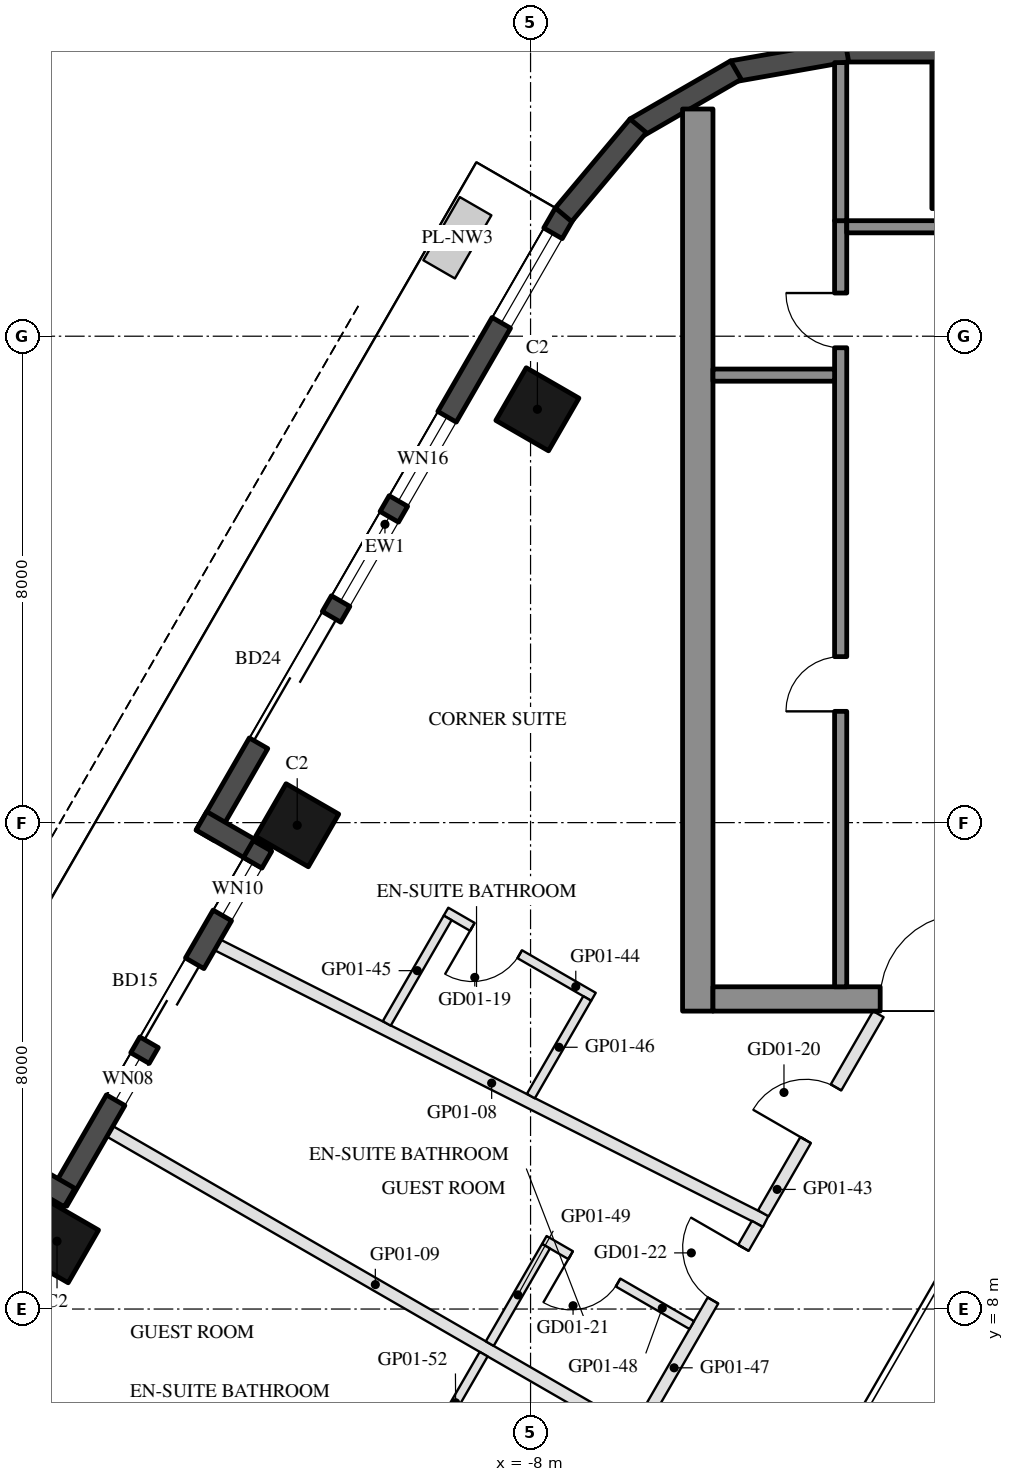
"""IFC4 building model, lengths in metres.
Left out: names, types, materials, properties, quantities, classifications, styles, units other than length and angle.
Written with IfcOpenShell. Run it as: python <this file> out.ifc"""

import sys

from ifc_helpers import new_model, si_unit, direction, frame, frame_2d, origin, origin_2d, place, context, subcontext, project, spatial, rectangle, hollow_rectangle, extrude, element, fill, save


model = new_model("IFC4")
c1 = context("Model", 3, precision=1e-05, world=origin(), true_north=direction((0.0, 1.0)))
c2 = subcontext(c1, "Body", "Model", "MODEL_VIEW")
j1 = project(units=[si_unit("LENGTHUNIT", "METRE"), si_unit("PLANEANGLEUNIT", "RADIAN")], contexts=[c1])
p1 = place(None, origin())
s1 = spatial("IfcSite", under=j1, at=p1, CompositionType="ELEMENT")
p2 = place(p1, origin())
s2 = spatial("IfcBuilding", under=s1, at=p2, CompositionType="ELEMENT")
p3 = place(p2, frame((0.0, 0.0, 50.2)))
s3 = spatial("IfcBuildingStorey", under=s2, at=p3, CompositionType="ELEMENT", Elevation=50.2)
for number, where, z_axis, x_axis in (
    (1, (-7.888, 22.798, 0.0), (0.0, 0.0, 1.0), (0.5, 0.866, 0.0)),
    (2, (-11.838, 15.957, 0.0), (0.0, 0.0, 1.0), (0.5, 0.866, 0.0)),
    (3, (-15.788, 9.115, 0.0), (0.0, 0.0, 1.0), (0.5, 0.866, 0.0)),
):
    element("IfcColumn", number, at=place(p3, frame(where, z_axis=z_axis, x_axis=x_axis)), inside=s3, PredefinedType="COLUMN", context=c2, shape_type="SweptSolid", body=[
        extrude(hollow_rectangle(XDim=1.0, YDim=1.0, WallThickness=0.045, at=origin_2d()), origin(), (0.0, 0.0, 1.0), 3.7),
    ])
p4 = place(p3, frame((0.0, 27.3, 0.0), z_axis=(0.0, 0.0, 1.0), x_axis=(1.0, 0.0, 0.0)))
e4 = element("IfcColumn", 4, at=p4, inside=s3, PredefinedType="COLUMN", context=c2, shape_type="SweptSolid", body=[
    extrude(hollow_rectangle(XDim=2.8, YDim=2.4, WallThickness=0.07, at=origin_2d()), origin(), (0.0, 0.0, 1.0), 3.7),
])
p5 = place(p3, frame((-7.441, 26.022, 0.0), z_axis=(0.0, 0.0, 1.0), x_axis=(-0.499992533062, -0.86602971478, 0.0)))
e5 = element("IfcWall", 5, at=p5, inside=s3, PredefinedType="SOLIDWALL", context=c2, shape_type="SweptSolid", body=[
    extrude(rectangle(XDim=11.816, YDim=0.35, at=frame_2d((5.908, 0.0))), origin(), (0.0, 0.0, 1.0), 3.55),
])
p6 = place(p5, frame((0.381, 0.0, 0.3)))
e6 = element("IfcOpeningElement", 6, at=p6, cuts=e5, PredefinedType="OPENING", context=c2, shape_type="SweptSolid", body=[
    extrude(rectangle(XDim=1.7, YDim=2.65, at=frame_2d((0.85, 1.325))), frame((0.0, 0.185, 0.0), z_axis=(0.0, -1.0, 0.0), x_axis=(1.0, 0.0, 0.0)), (0.0, 0.0, 1.0), 0.37),
])
p7 = place(p5, frame((7.666, 0.0, 0.0)))
e7 = element("IfcOpeningElement", 7, at=p7, cuts=e5, PredefinedType="OPENING", context=c2, shape_type="SweptSolid", body=[
    extrude(rectangle(XDim=2.4, YDim=2.4, at=frame_2d((1.2, 1.2))), frame((0.0, 0.185, 0.0), z_axis=(0.0, -1.0, 0.0), x_axis=(1.0, 0.0, 0.0)), (0.0, 0.0, 1.0), 0.37),
])
p8 = place(p5, frame((3.865, 0.0, 0.3)))
e8 = element("IfcOpeningElement", 8, at=p8, cuts=e5, PredefinedType="OPENING", context=c2, shape_type="SweptSolid", body=[
    extrude(rectangle(XDim=1.6, YDim=2.65, at=frame_2d((0.8, 1.325))), frame((0.0, 0.185, 0.0), z_axis=(0.0, -1.0, 0.0), x_axis=(1.0, 0.0, 0.0)), (0.0, 0.0, 1.0), 0.37),
])
p9 = place(p5, frame((5.765, 0.0, 0.3)))
e9 = element("IfcOpeningElement", 9, at=p9, cuts=e5, PredefinedType="OPENING", context=c2, shape_type="SweptSolid", body=[
    extrude(rectangle(XDim=1.6, YDim=2.65, at=frame_2d((0.8, 1.325))), frame((0.0, 0.185, 0.0), z_axis=(0.0, -1.0, 0.0), x_axis=(1.0, 0.0, 0.0)), (0.0, 0.0, 1.0), 0.37),
])
p10 = place(p3, frame((-13.413, 16.029, 0.0), z_axis=(0.0, 0.0, 1.0), x_axis=(0.866005645448, -0.500034220881, 0.0)))
e10 = element("IfcWall", 10, at=p10, inside=s3, PredefinedType="SOLIDWALL", context=c2, shape_type="SweptSolid", body=[
    extrude(rectangle(XDim=1.22, YDim=0.35, at=frame_2d((0.61, 0.0))), origin(), (0.0, 0.0, 1.0), 3.55),
])
p11 = place(p3, frame((-12.409, 15.617, 0.0), z_axis=(0.0, 0.0, 1.0), x_axis=(-0.500003597184, -0.866023326939, 0.0)))
e11 = element("IfcWall", 11, at=p11, inside=s3, PredefinedType="SOLIDWALL", context=c2, shape_type="SweptSolid", body=[
    extrude(rectangle(XDim=6.74, YDim=0.35, at=frame_2d((3.37, 0.0))), origin(), (0.0, 0.0, 1.0), 3.55),
])
p12 = place(p11, frame((0.32, 0.0, 0.3)))
e12 = element("IfcOpeningElement", 12, at=p12, cuts=e11, PredefinedType="OPENING", context=c2, shape_type="SweptSolid", body=[
    extrude(rectangle(XDim=1.0, YDim=2.65, at=frame_2d((0.5, 1.325))), frame((0.0, 0.185, 0.0), z_axis=(0.0, -1.0, 0.0), x_axis=(1.0, 0.0, 0.0)), (0.0, 0.0, 1.0), 0.37),
])
p13 = place(p11, frame((2.229, 0.0, 0.0)))
e13 = element("IfcOpeningElement", 13, at=p13, cuts=e11, PredefinedType="OPENING", context=c2, shape_type="SweptSolid", body=[
    extrude(rectangle(XDim=1.5, YDim=2.4, at=frame_2d((0.75, 1.2))), frame((0.0, 0.185, 0.0), z_axis=(0.0, -1.0, 0.0), x_axis=(1.0, 0.0, 0.0)), (0.0, 0.0, 1.0), 0.37),
])
p14 = place(p11, frame((4.029, 0.0, 0.3)))
e14 = element("IfcOpeningElement", 14, at=p14, cuts=e11, PredefinedType="OPENING", context=c2, shape_type="SweptSolid", body=[
    extrude(rectangle(XDim=0.8, YDim=2.65, at=frame_2d((0.4, 1.325))), frame((0.0, 0.185, 0.0), z_axis=(0.0, -1.0, 0.0), x_axis=(1.0, 0.0, 0.0)), (0.0, 0.0, 1.0), 0.37),
])
p15 = place(p3, frame((-15.581, 9.833, 0.0), z_axis=(0.0, 0.0, 1.0), x_axis=(-0.866055662726, 0.499947586314, 0.0)))
e15 = element("IfcWall", 15, at=p15, inside=s3, PredefinedType="SOLIDWALL", context=c2, shape_type="SweptSolid", body=[
    extrude(rectangle(XDim=1.22, YDim=0.35, at=frame_2d((0.61, 0.0))), origin(), (0.0, 0.0, 1.0), 3.55),
])
p16 = place(p3, frame((2.829, 28.685, 0.0), z_axis=(0.0, 0.0, 1.0), x_axis=(-1.0, 0.0, 0.0)))
e16 = element("IfcWall", 16, at=p16, inside=s3, PredefinedType="SOLIDWALL", context=c2, shape_type="SweptSolid", body=[
    extrude(rectangle(XDim=5.658, YDim=0.35, at=frame_2d((2.829, 0.0))), origin(), (0.0, 0.0, 1.0), 3.55),
])
for number, where, z_axis, x_axis in (
    (17, (-2.799, 28.688, 0.0), (0.0, 0.0, 1.0), (-0.985, -0.174, 0.0)),
    (18, (-4.623, 28.377, 0.0), (0.0, 0.0, 1.0), (-0.866, -0.5, 0.0)),
):
    element("IfcWall", number, at=place(p3, frame(where, z_axis=z_axis, x_axis=x_axis)), inside=s3, PredefinedType="SOLIDWALL", context=c2, shape_type="SweptSolid", body=[
        extrude(rectangle(XDim=1.91, YDim=0.35, at=frame_2d((0.955, 0.0))), origin(), (0.0, 0.0, 1.0), 3.55),
    ])
p17 = place(p3, frame((-6.23, 27.461, 0.0), z_axis=(0.0, 0.0, 1.0), x_axis=(-0.642808304945, -0.766027077259, 0.0)))
e19 = element("IfcWall", 19, at=p17, inside=s3, PredefinedType="SOLIDWALL", context=c2, shape_type="SweptSolid", body=[
    extrude(rectangle(XDim=1.91, YDim=0.35, at=frame_2d((0.955, 0.0))), origin(), (0.0, 0.0, 1.0), 3.55),
])
p18 = place(p3, frame((-5.25, 12.9, 0.0), z_axis=(0.0, 0.0, 1.0), x_axis=(0.0, 1.0, 0.0)))
e20 = element("IfcWall", 20, at=p18, inside=s3, PredefinedType="SHEAR", context=c2, shape_type="SweptSolid", body=[
    extrude(rectangle(XDim=14.837, YDim=0.5, at=frame_2d((7.418, 0.0))), origin(), (0.0, 0.0, 1.0), 3.5),
])
p19 = place(p3, frame((5.0, 13.1, 0.0), z_axis=(0.0, 0.0, 1.0), x_axis=(-1.0, 0.0, 0.0)))
e21 = element("IfcWall", 21, at=p19, inside=s3, PredefinedType="SHEAR", context=c2, shape_type="SweptSolid", body=[
    extrude(rectangle(XDim=10.0, YDim=0.4, at=frame_2d((5.0, 0.0))), origin(), (0.0, 0.0, 1.0), 3.5),
])
p20 = place(p19, frame((3.55, 0.0, 0.0)))
e22 = element("IfcOpeningElement", 22, at=p20, cuts=e21, PredefinedType="OPENING", context=c2, shape_type="SweptSolid", body=[
    extrude(rectangle(XDim=1.1, YDim=2.1, at=frame_2d((0.55, 1.05))), frame((0.0, 0.21, 0.0), z_axis=(0.0, -1.0, 0.0), x_axis=(1.0, 0.0, 0.0)), (0.0, 0.0, 1.0), 0.42),
])
p21 = place(p19, frame((5.85, 0.0, 0.0)))
e23 = element("IfcOpeningElement", 23, at=p21, cuts=e21, PredefinedType="OPENING", context=c2, shape_type="SweptSolid", body=[
    extrude(rectangle(XDim=1.4, YDim=2.1, at=frame_2d((0.7, 1.05))), frame((0.0, 0.21, 0.0), z_axis=(0.0, -1.0, 0.0), x_axis=(1.0, 0.0, 0.0)), (0.0, 0.0, 1.0), 0.42),
])
p22 = place(p3, frame((-2.9, 13.3, 0.0), z_axis=(0.0, 0.0, 1.0), x_axis=(0.0, 1.0, 0.0)))
e24 = element("IfcWall", 24, at=p22, inside=s3, PredefinedType="SHEAR", context=c2, shape_type="SweptSolid", body=[
    extrude(rectangle(XDim=12.6, YDim=0.2, at=frame_2d((6.3, 0.0))), origin(), (0.0, 0.0, 1.0), 3.5),
])
p23 = place(p22, frame((4.53, 0.0, 0.0)))
e25 = element("IfcOpeningElement", 25, at=p23, cuts=e24, PredefinedType="OPENING", context=c2, shape_type="SweptSolid", body=[
    extrude(rectangle(XDim=0.9, YDim=2.1, at=frame_2d((0.45, 1.05))), frame((0.0, 0.11, 0.0), z_axis=(0.0, -1.0, 0.0), x_axis=(1.0, 0.0, 0.0)), (0.0, 0.0, 1.0), 0.22),
])
p24 = place(p22, frame((10.51, 0.0, 0.0)))
e26 = element("IfcOpeningElement", 26, at=p24, cuts=e24, PredefinedType="OPENING", context=c2, shape_type="SweptSolid", body=[
    extrude(rectangle(XDim=0.9, YDim=2.1, at=frame_2d((0.45, 1.05))), frame((0.0, 0.11, 0.0), z_axis=(0.0, -1.0, 0.0), x_axis=(1.0, 0.0, 0.0)), (0.0, 0.0, 1.0), 0.22),
])
p25 = place(p3, frame((-0.4, 25.8, 0.0), z_axis=(0.0, 0.0, 1.0), x_axis=(-1.0, 0.0, 0.0)))
e27 = element("IfcWall", 27, at=p25, inside=s3, PredefinedType="SHEAR", context=c2, shape_type="SweptSolid", body=[
    extrude(rectangle(XDim=2.4, YDim=0.2, at=frame_2d((1.2, 0.0))), origin(), (0.0, 0.0, 1.0), 3.5),
])
p26 = place(p3, frame((-3.0, 23.36, 0.0), z_axis=(0.0, 0.0, 1.0), x_axis=(-1.0, 0.0, 0.0)))
e28 = element("IfcWall", 28, at=p26, inside=s3, PredefinedType="SHEAR", context=c2, shape_type="SweptSolid", body=[
    extrude(rectangle(XDim=2.0, YDim=0.2, at=frame_2d((1.0, 0.0))), origin(), (0.0, 0.0, 1.0), 3.5),
])
p27 = place(p3, frame((-2.9, 25.9, 0.0), z_axis=(0.0, 0.0, 1.0), x_axis=(0.0, 1.0, 0.0)))
e29 = element("IfcWall", 29, at=p27, inside=s3, PredefinedType="SHEAR", context=c2, shape_type="SweptSolid", body=[
    extrude(rectangle(XDim=2.6, YDim=0.2, at=frame_2d((1.3, 0.0))), origin(), (0.0, 0.0, 1.0), 3.5),
])
p28 = place(p3, frame((-13.147, 13.989, 0.0), z_axis=(0.0, 0.0, 1.0), x_axis=(0.892898572595, -0.450257858408, 0.0)))
e30 = element("IfcWall", 30, at=p28, inside=s3, PredefinedType="PARTITIONING", context=c2, shape_type="SweptSolid", body=[
    extrude(rectangle(XDim=10.096, YDim=0.2, at=frame_2d((5.048, 0.0))), origin(), (0.0, 0.0, 1.0), 2.96),
])
p29 = place(p3, frame((-14.917, 10.922, 0.0), z_axis=(0.0, 0.0, 1.0), x_axis=(0.866022637375, -0.500004791531, 0.0)))
e31 = element("IfcWall", 31, at=p29, inside=s3, PredefinedType="PARTITIONING", context=c2, shape_type="SweptSolid", body=[
    extrude(rectangle(XDim=10.08, YDim=0.2, at=frame_2d((5.04, 0.0))), origin(), (0.0, 0.0, 1.0), 2.96),
])
p30 = place(p3, frame((-17.997, 7.388, 0.0), z_axis=(0.0, 0.0, 1.0), x_axis=(0.892478457214, -0.451090016968, 0.0)))
e32 = element("IfcWall", 32, at=p30, inside=s3, PredefinedType="PARTITIONING", context=c2, shape_type="SweptSolid", body=[
    extrude(rectangle(XDim=10.997, YDim=0.2, at=frame_2d((5.499, 0.0))), origin(), (0.0, 0.0, 1.0), 2.96),
])
p31 = place(p3, frame((-4.172, 9.574, 0.0), z_axis=(0.0, 0.0, 1.0), x_axis=(0.499985062256, 0.866034027923, 0.0)))
e33 = element("IfcWall", 33, at=p31, inside=s3, PredefinedType="PARTITIONING", context=c2, shape_type="SweptSolid", body=[
    extrude(rectangle(XDim=3.782, YDim=0.2, at=frame_2d((1.891, 0.0))), origin(), (0.0, 0.0, 1.0), 2.95),
])
p32 = place(p31, frame((1.391, 0.0, 0.0)))
e34 = element("IfcOpeningElement", 34, at=p32, cuts=e33, PredefinedType="OPENING", context=c2, shape_type="SweptSolid", body=[
    extrude(rectangle(XDim=1.0, YDim=2.1, at=frame_2d((0.5, 1.05))), frame((0.0, 0.11, 0.0), z_axis=(0.0, -1.0, 0.0), x_axis=(1.0, 0.0, 0.0)), (0.0, 0.0, 1.0), 0.22),
])
p33 = place(p3, frame((-6.965, 13.136, 0.0), z_axis=(0.0, 0.0, 1.0), x_axis=(-0.866034573852, 0.49998411664, 0.0)))
e35 = element("IfcWall", 35, at=p33, inside=s3, PredefinedType="PARTITIONING", context=c2, shape_type="SweptSolid", body=[
    extrude(rectangle(XDim=2.8, YDim=0.15, at=frame_2d((1.4, 0.0))), origin(), (0.0, 0.0, 1.0), 2.95),
])
p34 = place(p33, frame((1.4, 0.0, 0.0)))
e36 = element("IfcOpeningElement", 36, at=p34, cuts=e35, PredefinedType="OPENING", context=c2, shape_type="SweptSolid", body=[
    extrude(rectangle(XDim=0.9, YDim=2.1, at=frame_2d((0.45, 1.05))), frame((0.0, 0.085, 0.0), z_axis=(0.0, -1.0, 0.0), x_axis=(1.0, 0.0, 0.0)), (0.0, 0.0, 1.0), 0.17),
])
p35 = place(p3, frame((-9.363, 14.433, 0.0), z_axis=(0.0, 0.0, 1.0), x_axis=(-0.500056363668, -0.86599285976, 0.0)))
e37 = element("IfcWall", 37, at=p35, inside=s3, PredefinedType="PARTITIONING", context=c2, shape_type="SweptSolid", body=[
    extrude(rectangle(XDim=2.004, YDim=0.15, at=frame_2d((1.002, 0.0))), origin(), (0.0, 0.0, 1.0), 2.95),
])
p36 = place(p3, frame((-7.068, 13.108, 0.0), z_axis=(0.0, 0.0, 1.0), x_axis=(-0.4999770169, -0.866038672677, 0.0)))
e38 = element("IfcWall", 38, at=p36, inside=s3, PredefinedType="PARTITIONING", context=c2, shape_type="SweptSolid", body=[
    extrude(rectangle(XDim=1.854, YDim=0.15, at=frame_2d((0.927, 0.0))), origin(), (0.0, 0.0, 1.0), 2.95),
])
p37 = place(p3, frame((-6.225, 6.019, 0.0), z_axis=(0.0, 0.0, 1.0), x_axis=(0.499998439657, 0.866026304647, 0.0)))
e39 = element("IfcWall", 39, at=p37, inside=s3, PredefinedType="PARTITIONING", context=c2, shape_type="SweptSolid", body=[
    extrude(rectangle(XDim=3.905, YDim=0.2, at=frame_2d((1.953, 0.0))), origin(), (0.0, 0.0, 1.0), 2.95),
])
p38 = place(p37, frame((2.45, 0.0, 0.0)))
e40 = element("IfcOpeningElement", 40, at=p38, cuts=e39, PredefinedType="OPENING", context=c2, shape_type="SweptSolid", body=[
    extrude(rectangle(XDim=1.0, YDim=2.1, at=frame_2d((0.5, 1.05))), frame((0.0, 0.11, 0.0), z_axis=(0.0, -1.0, 0.0), x_axis=(1.0, 0.0, 0.0)), (0.0, 0.0, 1.0), 0.22),
])
p39 = place(p3, frame((-5.349, 7.736, 0.0), z_axis=(0.0, 0.0, 1.0), x_axis=(-0.866056369097, 0.49994636267, 0.0)))
e41 = element("IfcWall", 41, at=p39, inside=s3, PredefinedType="PARTITIONING", context=c2, shape_type="SweptSolid", body=[
    extrude(rectangle(XDim=2.8, YDim=0.15, at=frame_2d((1.4, 0.0))), origin(), (0.0, 0.0, 1.0), 2.95),
])
p40 = place(p39, frame((1.4, 0.0, 0.0)))
e42 = element("IfcOpeningElement", 42, at=p40, cuts=e41, PredefinedType="OPENING", context=c2, shape_type="SweptSolid", body=[
    extrude(rectangle(XDim=0.9, YDim=2.1, at=frame_2d((0.45, 1.05))), frame((0.0, 0.085, 0.0), z_axis=(0.0, -1.0, 0.0), x_axis=(1.0, 0.0, 0.0)), (0.0, 0.0, 1.0), 0.17),
])
p41 = place(p3, frame((-7.746, 9.033, 0.0), z_axis=(0.0, 0.0, 1.0), x_axis=(-0.500042316284, -0.866000971088, 0.0)))
e43 = element("IfcWall", 43, at=p41, inside=s3, PredefinedType="PARTITIONING", context=c2, shape_type="SweptSolid", body=[
    extrude(rectangle(XDim=1.85, YDim=0.15, at=frame_2d((0.925, 0.0))), origin(), (0.0, 0.0, 1.0), 2.95),
])
p42 = place(p3, frame((-8.771, 7.258, 0.0), z_axis=(0.0, 0.0, 1.0), x_axis=(-0.500154078321, -0.865936428347, 0.0)))
e44 = element("IfcWall", 44, at=p42, inside=s3, PredefinedType="PARTITIONING", context=c2, shape_type="SweptSolid", body=[
    extrude(rectangle(XDim=1.844, YDim=0.15, at=frame_2d((0.922, 0.0))), origin(), (0.0, 0.0, 1.0), 2.95),
])
p43 = place(p6, origin())
e45 = element("IfcWindow", 45, at=p43, inside=s3, PartitioningType="SINGLE_PANEL", PredefinedType="WINDOW", context=c2, shape_type="SweptSolid", body=[
    extrude(rectangle(XDim=1.7, YDim=2.65, at=frame_2d((0.85, 1.325))), frame((0.0, 0.03, 0.0), z_axis=(0.0, -1.0, 0.0), x_axis=(1.0, 0.0, 0.0)), (0.0, 0.0, 1.0), 0.06),
])
fill(e6, e45)
p44 = place(p7, frame((2.4, 0.0, 0.0), z_axis=(0.0, 0.0, 1.0), x_axis=(-1.0, 0.0, 0.0)))
e46 = element("IfcDoor", 46, at=p44, inside=s3, OperationType="SLIDING_TO_LEFT", PredefinedType="DOOR", context=c2, shape_type="SweptSolid", body=[
    extrude(rectangle(XDim=2.4, YDim=2.4, at=frame_2d((1.2, 1.2))), frame((0.0, 0.025, 0.0), z_axis=(0.0, -1.0, 0.0), x_axis=(1.0, 0.0, 0.0)), (0.0, 0.0, 1.0), 0.05),
])
fill(e7, e46)
p45 = place(p8, origin())
e47 = element("IfcWindow", 47, at=p45, inside=s3, PartitioningType="SINGLE_PANEL", PredefinedType="WINDOW", context=c2, shape_type="SweptSolid", body=[
    extrude(rectangle(XDim=1.6, YDim=2.65, at=frame_2d((0.8, 1.325))), frame((0.0, 0.03, 0.0), z_axis=(0.0, -1.0, 0.0), x_axis=(1.0, 0.0, 0.0)), (0.0, 0.0, 1.0), 0.06),
])
fill(e8, e47)
p46 = place(p9, origin())
e48 = element("IfcWindow", 48, at=p46, inside=s3, PartitioningType="SINGLE_PANEL", PredefinedType="WINDOW", context=c2, shape_type="SweptSolid", body=[
    extrude(rectangle(XDim=1.6, YDim=2.65, at=frame_2d((0.8, 1.325))), frame((0.0, 0.03, 0.0), z_axis=(0.0, -1.0, 0.0), x_axis=(1.0, 0.0, 0.0)), (0.0, 0.0, 1.0), 0.06),
])
fill(e9, e48)
p47 = place(p12, origin())
e49 = element("IfcWindow", 49, at=p47, inside=s3, PartitioningType="SINGLE_PANEL", PredefinedType="WINDOW", context=c2, shape_type="SweptSolid", body=[
    extrude(rectangle(XDim=1.0, YDim=2.65, at=frame_2d((0.5, 1.325))), frame((0.0, 0.03, 0.0), z_axis=(0.0, -1.0, 0.0), x_axis=(1.0, 0.0, 0.0)), (0.0, 0.0, 1.0), 0.06),
])
fill(e12, e49)
p48 = place(p13, frame((1.5, 0.0, 0.0), z_axis=(0.0, 0.0, 1.0), x_axis=(-1.0, 0.0, 0.0)))
e50 = element("IfcDoor", 50, at=p48, inside=s3, OperationType="SLIDING_TO_LEFT", PredefinedType="DOOR", context=c2, shape_type="SweptSolid", body=[
    extrude(rectangle(XDim=1.5, YDim=2.4, at=frame_2d((0.75, 1.2))), frame((0.0, 0.025, 0.0), z_axis=(0.0, -1.0, 0.0), x_axis=(1.0, 0.0, 0.0)), (0.0, 0.0, 1.0), 0.05),
])
fill(e13, e50)
p49 = place(p14, origin())
e51 = element("IfcWindow", 51, at=p49, inside=s3, PartitioningType="SINGLE_PANEL", PredefinedType="WINDOW", context=c2, shape_type="SweptSolid", body=[
    extrude(rectangle(XDim=0.8, YDim=2.65, at=frame_2d((0.4, 1.325))), frame((0.0, 0.03, 0.0), z_axis=(0.0, -1.0, 0.0), x_axis=(1.0, 0.0, 0.0)), (0.0, 0.0, 1.0), 0.06),
])
fill(e14, e51)
p50 = place(p23, origin())
e52 = element("IfcDoor", 52, at=p50, inside=s3, OperationType="SINGLE_SWING_LEFT", PredefinedType="DOOR", context=c2, shape_type="SweptSolid", body=[
    extrude(rectangle(XDim=0.9, YDim=2.1, at=frame_2d((0.45, 1.05))), frame((0.0, 0.025, 0.0), z_axis=(0.0, -1.0, 0.0), x_axis=(1.0, 0.0, 0.0)), (0.0, 0.0, 1.0), 0.05),
])
fill(e25, e52)
p51 = place(p24, origin())
e53 = element("IfcDoor", 53, at=p51, inside=s3, OperationType="SINGLE_SWING_RIGHT", PredefinedType="DOOR", context=c2, shape_type="SweptSolid", body=[
    extrude(rectangle(XDim=0.9, YDim=2.1, at=frame_2d((0.45, 1.05))), frame((0.0, 0.025, 0.0), z_axis=(0.0, -1.0, 0.0), x_axis=(1.0, 0.0, 0.0)), (0.0, 0.0, 1.0), 0.05),
])
fill(e26, e53)
p52 = place(p21, frame((1.4, 0.0, 0.0), z_axis=(0.0, 0.0, 1.0), x_axis=(-1.0, 0.0, 0.0)))
e54 = element("IfcDoor", 54, at=p52, inside=s3, OperationType="DOUBLE_DOOR_SINGLE_SWING", PredefinedType="DOOR", context=c2, shape_type="SweptSolid", body=[
    extrude(rectangle(XDim=1.4, YDim=2.1, at=frame_2d((0.7, 1.05))), frame((0.0, 0.025, 0.0), z_axis=(0.0, -1.0, 0.0), x_axis=(1.0, 0.0, 0.0)), (0.0, 0.0, 1.0), 0.05),
])
fill(e23, e54)
p53 = place(p34, origin())
e55 = element("IfcDoor", 55, at=p53, inside=s3, OperationType="SINGLE_SWING_RIGHT", PredefinedType="DOOR", context=c2, shape_type="SweptSolid", body=[
    extrude(rectangle(XDim=0.9, YDim=2.1, at=frame_2d((0.45, 1.05))), frame((0.0, 0.025, 0.0), z_axis=(0.0, -1.0, 0.0), x_axis=(1.0, 0.0, 0.0)), (0.0, 0.0, 1.0), 0.05),
])
fill(e36, e55)
p54 = place(p32, origin())
e56 = element("IfcDoor", 56, at=p54, inside=s3, OperationType="SINGLE_SWING_LEFT", PredefinedType="DOOR", context=c2, shape_type="SweptSolid", body=[
    extrude(rectangle(XDim=1.0, YDim=2.1, at=frame_2d((0.5, 1.05))), frame((0.0, 0.025, 0.0), z_axis=(0.0, -1.0, 0.0), x_axis=(1.0, 0.0, 0.0)), (0.0, 0.0, 1.0), 0.05),
])
fill(e34, e56)
p55 = place(p40, origin())
e57 = element("IfcDoor", 57, at=p55, inside=s3, OperationType="SINGLE_SWING_RIGHT", PredefinedType="DOOR", context=c2, shape_type="SweptSolid", body=[
    extrude(rectangle(XDim=0.9, YDim=2.1, at=frame_2d((0.45, 1.05))), frame((0.0, 0.025, 0.0), z_axis=(0.0, -1.0, 0.0), x_axis=(1.0, 0.0, 0.0)), (0.0, 0.0, 1.0), 0.05),
])
fill(e42, e57)
p56 = place(p38, origin())
e58 = element("IfcDoor", 58, at=p56, inside=s3, OperationType="SINGLE_SWING_RIGHT", PredefinedType="DOOR", context=c2, shape_type="SweptSolid", body=[
    extrude(rectangle(XDim=1.0, YDim=2.1, at=frame_2d((0.5, 1.05))), frame((0.0, 0.025, 0.0), z_axis=(0.0, -1.0, 0.0), x_axis=(1.0, 0.0, 0.0)), (0.0, 0.0, 1.0), 0.05),
])
fill(e40, e58)
save(model, sys.argv[1])
